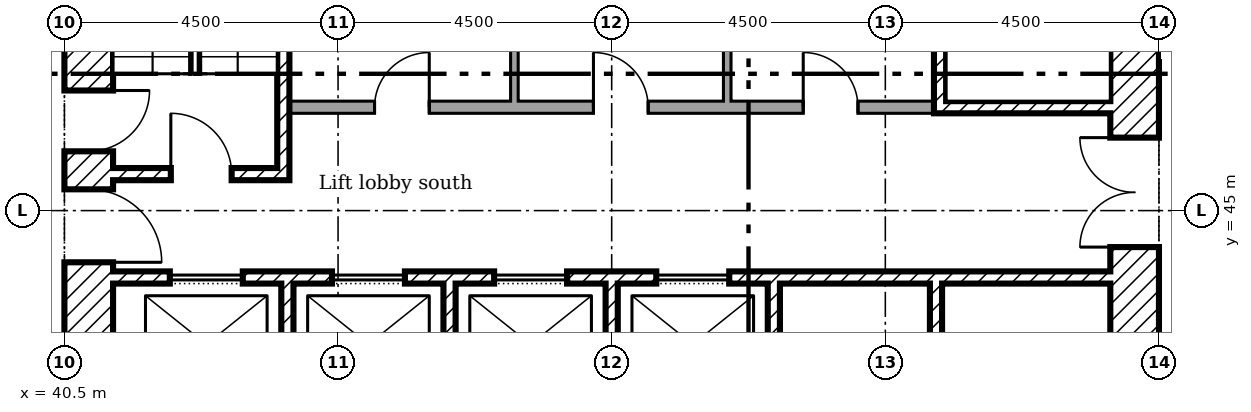
"""IFC4 building model, lengths in metres.
Left out: names, types, materials, properties, quantities, classifications, styles, units other than length and angle.
Written with IfcOpenShell. Run it as: python <this file> out.ifc"""

import sys

from ifc_helpers import new_model, si_unit, direction, frame, frame_2d, origin, place, context, subcontext, project, spatial, rectangle, extrude, element, fill, save


model = new_model("IFC4")
c1 = context("Model", 3, precision=1e-05, world=origin(), true_north=direction((0.0, 1.0)))
c2 = subcontext(c1, "Body", "Model", "MODEL_VIEW")
j1 = project(units=[si_unit("LENGTHUNIT", "METRE"), si_unit("PLANEANGLEUNIT", "RADIAN")], contexts=[c1])
p1 = place(None, origin())
s1 = spatial("IfcSite", under=j1, at=p1, CompositionType="ELEMENT")
p2 = place(p1, origin())
s2 = spatial("IfcBuilding", under=s1, at=p2, CompositionType="ELEMENT")
p3 = place(p2, frame((0.0, 0.0, 76.2)))
s3 = spatial("IfcBuildingStorey", under=s2, at=p3, CompositionType="ELEMENT", Elevation=76.2)
p4 = place(p3, frame((58.1, 40.5, 0.0), z_axis=(0.0, 0.0, 1.0), x_axis=(0.0, 1.0, 0.0)))
e1 = element("IfcWall", 1, at=p4, inside=s3, PredefinedType="SHEAR", context=c2, shape_type="SweptSolid", body=[
    extrude(rectangle(XDim=18.0, YDim=0.8, at=frame_2d((9.0, 0.0))), origin(), (0.0, 0.0, 1.0), 3.35),
])
p5 = place(p4, frame((13.15, 0.0, 0.0)))
e2 = element("IfcOpeningElement", 2, at=p5, cuts=e1, PredefinedType="OPENING", context=c2, shape_type="SweptSolid", body=[
    extrude(rectangle(XDim=1.2, YDim=2.1, at=frame_2d((0.6, 1.05))), frame((0.0, 0.41, 0.0), z_axis=(0.0, -1.0, 0.0), x_axis=(1.0, 0.0, 0.0)), (0.0, 0.0, 1.0), 0.82),
])
p6 = place(p4, frame((3.9, 0.0, 0.0)))
e3 = element("IfcOpeningElement", 3, at=p6, cuts=e1, PredefinedType="OPENING", context=c2, shape_type="SweptSolid", body=[
    extrude(rectangle(XDim=1.8, YDim=2.1, at=frame_2d((0.9, 1.05))), frame((0.0, 0.41, 0.0), z_axis=(0.0, -1.0, 0.0), x_axis=(1.0, 0.0, 0.0)), (0.0, 0.0, 1.0), 0.82),
])
p7 = place(p4, frame((11.525, 0.0, 0.0)))
e4 = element("IfcOpeningElement", 4, at=p7, cuts=e1, PredefinedType="OPENING", context=c2, shape_type="SweptSolid", body=[
    extrude(rectangle(XDim=1.0, YDim=2.1, at=frame_2d((0.5, 1.05))), frame((0.0, 0.41, 0.0), z_axis=(0.0, -1.0, 0.0), x_axis=(1.0, 0.0, 0.0)), (0.0, 0.0, 1.0), 0.82),
])
p8 = place(p3, frame((40.9, 40.5, 0.0), z_axis=(0.0, 0.0, 1.0), x_axis=(0.0, 1.0, 0.0)))
e5 = element("IfcWall", 5, at=p8, inside=s3, PredefinedType="SHEAR", context=c2, shape_type="SweptSolid", body=[
    extrude(rectangle(XDim=18.0, YDim=0.8, at=frame_2d((9.0, 0.0))), origin(), (0.0, 0.0, 1.0), 3.35),
])
p9 = place(p8, frame((3.65, 0.0, 0.0)))
e6 = element("IfcOpeningElement", 6, at=p9, cuts=e5, PredefinedType="OPENING", context=c2, shape_type="SweptSolid", body=[
    extrude(rectangle(XDim=1.2, YDim=2.1, at=frame_2d((0.6, 1.05))), frame((0.0, 0.41, 0.0), z_axis=(0.0, -1.0, 0.0), x_axis=(1.0, 0.0, 0.0)), (0.0, 0.0, 1.0), 0.82),
])
p10 = place(p8, frame((5.475, 0.0, 0.0)))
e7 = element("IfcOpeningElement", 7, at=p10, cuts=e5, PredefinedType="OPENING", context=c2, shape_type="SweptSolid", body=[
    extrude(rectangle(XDim=1.0, YDim=2.1, at=frame_2d((0.5, 1.05))), frame((0.0, 0.41, 0.0), z_axis=(0.0, -1.0, 0.0), x_axis=(1.0, 0.0, 0.0)), (0.0, 0.0, 1.0), 0.82),
])
p11 = place(p8, frame((12.3, 0.0, 0.0)))
e8 = element("IfcOpeningElement", 8, at=p11, cuts=e5, PredefinedType="OPENING", context=c2, shape_type="SweptSolid", body=[
    extrude(rectangle(XDim=1.0, YDim=2.1, at=frame_2d((0.5, 1.05))), frame((0.0, 0.41, 0.0), z_axis=(0.0, -1.0, 0.0), x_axis=(1.0, 0.0, 0.0)), (0.0, 0.0, 1.0), 0.82),
])
for number, where, z_axis, x_axis in (
    (9, (44.167, 41.3, 0.0), (0.0, 0.0, 1.0), (0.0, 1.0, 0.0)),
    (10, (46.833, 41.3, 0.0), (0.0, 0.0, 1.0), (0.0, 1.0, 0.0)),
    (11, (49.5, 41.3, 0.0), (0.0, 0.0, 1.0), (0.0, 1.0, 0.0)),
    (12, (52.167, 41.3, 0.0), (0.0, 0.0, 1.0), (0.0, 1.0, 0.0)),
    (13, (54.833, 41.3, 0.0), (0.0, 0.0, 1.0), (0.0, 1.0, 0.0)),
):
    element("IfcWall", number, at=place(p3, frame(where, z_axis=z_axis, x_axis=x_axis)), inside=s3, PredefinedType="SHEAR", context=c2, shape_type="SweptSolid", body=[
        extrude(rectangle(XDim=2.5, YDim=0.2, at=frame_2d((1.25, 0.0))), origin(), (0.0, 0.0, 1.0), 3.35),
    ])
p12 = place(p3, frame((41.3, 43.9, 0.0)))
e14 = element("IfcWall", 14, at=p12, inside=s3, PredefinedType="SHEAR", context=c2, shape_type="SweptSolid", body=[
    extrude(rectangle(XDim=16.4, YDim=0.2, at=frame_2d((8.2, 0.0))), origin(), (0.0, 0.0, 1.0), 3.35),
])
p13 = place(p12, frame((0.933, 0.0, 0.0)))
e15 = element("IfcOpeningElement", 15, at=p13, cuts=e14, PredefinedType="OPENING", context=c2, shape_type="SweptSolid", body=[
    extrude(rectangle(XDim=1.2, YDim=2.1, at=frame_2d((0.6, 1.05))), frame((0.0, 0.11, 0.0), z_axis=(0.0, -1.0, 0.0), x_axis=(1.0, 0.0, 0.0)), (0.0, 0.0, 1.0), 0.22),
])
p14 = place(p12, frame((3.6, 0.0, 0.0)))
e16 = element("IfcOpeningElement", 16, at=p14, cuts=e14, PredefinedType="OPENING", context=c2, shape_type="SweptSolid", body=[
    extrude(rectangle(XDim=1.2, YDim=2.1, at=frame_2d((0.6, 1.05))), frame((0.0, 0.11, 0.0), z_axis=(0.0, -1.0, 0.0), x_axis=(1.0, 0.0, 0.0)), (0.0, 0.0, 1.0), 0.22),
])
p15 = place(p12, frame((6.267, 0.0, 0.0)))
e17 = element("IfcOpeningElement", 17, at=p15, cuts=e14, PredefinedType="OPENING", context=c2, shape_type="SweptSolid", body=[
    extrude(rectangle(XDim=1.2, YDim=2.1, at=frame_2d((0.6, 1.05))), frame((0.0, 0.11, 0.0), z_axis=(0.0, -1.0, 0.0), x_axis=(1.0, 0.0, 0.0)), (0.0, 0.0, 1.0), 0.22),
])
p16 = place(p12, frame((8.933, 0.0, 0.0)))
e18 = element("IfcOpeningElement", 18, at=p16, cuts=e14, PredefinedType="OPENING", context=c2, shape_type="SweptSolid", body=[
    extrude(rectangle(XDim=1.2, YDim=2.1, at=frame_2d((0.6, 1.05))), frame((0.0, 0.11, 0.0), z_axis=(0.0, -1.0, 0.0), x_axis=(1.0, 0.0, 0.0)), (0.0, 0.0, 1.0), 0.22),
])
p17 = place(p3, frame((44.1, 45.5, 0.0), z_axis=(0.0, 0.0, 1.0), x_axis=(0.0, 1.0, 0.0)))
e19 = element("IfcWall", 19, at=p17, inside=s3, PredefinedType="SHEAR", context=c2, shape_type="SweptSolid", body=[
    extrude(rectangle(XDim=6.9, YDim=0.2, at=frame_2d((3.45, 0.0))), origin(), (0.0, 0.0, 1.0), 3.35),
])
p18 = place(p3, frame((41.3, 45.6, 0.0)))
e20 = element("IfcWall", 20, at=p18, inside=s3, PredefinedType="SHEAR", context=c2, shape_type="SweptSolid", body=[
    extrude(rectangle(XDim=2.7, YDim=0.2, at=frame_2d((1.35, 0.0))), origin(), (0.0, 0.0, 1.0), 3.35),
])
p19 = place(p18, frame((0.95, 0.0, 0.0)))
e21 = element("IfcOpeningElement", 21, at=p19, cuts=e20, PredefinedType="OPENING", context=c2, shape_type="SweptSolid", body=[
    extrude(rectangle(XDim=1.0, YDim=2.1, at=frame_2d((0.5, 1.05))), frame((0.0, 0.11, 0.0), z_axis=(0.0, -1.0, 0.0), x_axis=(1.0, 0.0, 0.0)), (0.0, 0.0, 1.0), 0.22),
])
p20 = place(p3, frame((54.8, 46.7, 0.0)))
e22 = element("IfcWall", 22, at=p20, inside=s3, PredefinedType="SHEAR", context=c2, shape_type="SweptSolid", body=[
    extrude(rectangle(XDim=2.9, YDim=0.2, at=frame_2d((1.45, 0.0))), origin(), (0.0, 0.0, 1.0), 3.35),
])
p21 = place(p3, frame((54.9, 46.8, 0.0), z_axis=(0.0, 0.0, 1.0), x_axis=(0.0, 1.0, 0.0)))
e23 = element("IfcWall", 23, at=p21, inside=s3, PredefinedType="SHEAR", context=c2, shape_type="SweptSolid", body=[
    extrude(rectangle(XDim=6.5, YDim=0.2, at=frame_2d((3.25, 0.0))), origin(), (0.0, 0.0, 1.0), 3.35),
])
p22 = place(p3, frame((44.2, 46.7, 0.0)))
e24 = element("IfcWall", 24, at=p22, inside=s3, PredefinedType="PARTITIONING", context=c2, shape_type="SweptSolid", body=[
    extrude(rectangle(XDim=10.6, YDim=0.2, at=frame_2d((5.3, 0.0))), origin(), (0.0, 0.0, 1.0), 3.35),
])
p23 = place(p22, frame((1.4, 0.0, 0.0)))
e25 = element("IfcOpeningElement", 25, at=p23, cuts=e24, PredefinedType="OPENING", context=c2, shape_type="SweptSolid", body=[
    extrude(rectangle(XDim=0.9, YDim=2.1, at=frame_2d((0.45, 1.05))), frame((0.0, 0.11, 0.0), z_axis=(0.0, -1.0, 0.0), x_axis=(1.0, 0.0, 0.0)), (0.0, 0.0, 1.0), 0.22),
])
p24 = place(p22, frame((5.0, 0.0, 0.0)))
e26 = element("IfcOpeningElement", 26, at=p24, cuts=e24, PredefinedType="OPENING", context=c2, shape_type="SweptSolid", body=[
    extrude(rectangle(XDim=0.9, YDim=2.1, at=frame_2d((0.45, 1.05))), frame((0.0, 0.11, 0.0), z_axis=(0.0, -1.0, 0.0), x_axis=(1.0, 0.0, 0.0)), (0.0, 0.0, 1.0), 0.22),
])
p25 = place(p22, frame((8.45, 0.0, 0.0)))
e27 = element("IfcOpeningElement", 27, at=p25, cuts=e24, PredefinedType="OPENING", context=c2, shape_type="SweptSolid", body=[
    extrude(rectangle(XDim=0.9, YDim=2.1, at=frame_2d((0.45, 1.05))), frame((0.0, 0.11, 0.0), z_axis=(0.0, -1.0, 0.0), x_axis=(1.0, 0.0, 0.0)), (0.0, 0.0, 1.0), 0.22),
])
p26 = place(p3, frame((47.9, 46.8, 0.0), z_axis=(0.0, 0.0, 1.0), x_axis=(0.0, 1.0, 0.0)))
e28 = element("IfcWall", 28, at=p26, inside=s3, PredefinedType="PARTITIONING", context=c2, shape_type="SweptSolid", body=[
    extrude(rectangle(XDim=5.0, YDim=0.125, at=frame_2d((2.5, 0.0))), origin(), (0.0, 0.0, 1.0), 3.35),
])
p27 = place(p3, frame((51.4, 46.8, 0.0), z_axis=(0.0, 0.0, 1.0), x_axis=(0.0, 1.0, 0.0)))
e29 = element("IfcWall", 29, at=p27, inside=s3, PredefinedType="PARTITIONING", context=c2, shape_type="SweptSolid", body=[
    extrude(rectangle(XDim=2.762, YDim=0.125, at=frame_2d((1.381, 0.0))), origin(), (0.0, 0.0, 1.0), 3.35),
])
p28 = place(p6, origin())
e30 = element("IfcDoor", 30, at=p28, inside=s3, OperationType="DOUBLE_DOOR_SINGLE_SWING", PredefinedType="DOOR", context=c2, shape_type="SweptSolid", body=[
    extrude(rectangle(XDim=1.8, YDim=2.1, at=frame_2d((0.9, 1.05))), frame((0.0, 0.025, 0.0), z_axis=(0.0, -1.0, 0.0), x_axis=(1.0, 0.0, 0.0)), (0.0, 0.0, 1.0), 0.05),
])
fill(e3, e30)
p29 = place(p9, frame((1.2, 0.0, 0.0), x_axis=(-1.0, 0.0, 0.0)))
e31 = element("IfcDoor", 31, at=p29, inside=s3, OperationType="SINGLE_SWING_LEFT", PredefinedType="DOOR", context=c2, shape_type="SweptSolid", body=[
    extrude(rectangle(XDim=1.2, YDim=2.1, at=frame_2d((0.6, 1.05))), frame((0.0, 0.025, 0.0), z_axis=(0.0, -1.0, 0.0), x_axis=(1.0, 0.0, 0.0)), (0.0, 0.0, 1.0), 0.05),
])
fill(e6, e31)
p30 = place(p19, origin())
e32 = element("IfcDoor", 32, at=p30, inside=s3, OperationType="SINGLE_SWING_RIGHT", PredefinedType="DOOR", context=c2, shape_type="SweptSolid", body=[
    extrude(rectangle(XDim=1.0, YDim=2.1, at=frame_2d((0.5, 1.05))), frame((0.0, 0.025, 0.0), z_axis=(0.0, -1.0, 0.0), x_axis=(1.0, 0.0, 0.0)), (0.0, 0.0, 1.0), 0.05),
])
fill(e21, e32)
p31 = place(p10, frame((1.0, 0.0, 0.0), x_axis=(-1.0, 0.0, 0.0)))
e33 = element("IfcDoor", 33, at=p31, inside=s3, OperationType="SINGLE_SWING_RIGHT", PredefinedType="DOOR", context=c2, shape_type="SweptSolid", body=[
    extrude(rectangle(XDim=1.0, YDim=2.1, at=frame_2d((0.5, 1.05))), frame((0.0, 0.025, 0.0), z_axis=(0.0, -1.0, 0.0), x_axis=(1.0, 0.0, 0.0)), (0.0, 0.0, 1.0), 0.05),
])
fill(e7, e33)
p32 = place(p23, origin())
e34 = element("IfcDoor", 34, at=p32, inside=s3, OperationType="SINGLE_SWING_LEFT", PredefinedType="DOOR", context=c2, shape_type="SweptSolid", body=[
    extrude(rectangle(XDim=0.9, YDim=2.1, at=frame_2d((0.45, 1.05))), frame((0.0, 0.025, 0.0), z_axis=(0.0, -1.0, 0.0), x_axis=(1.0, 0.0, 0.0)), (0.0, 0.0, 1.0), 0.05),
])
fill(e25, e34)
p33 = place(p24, origin())
e35 = element("IfcDoor", 35, at=p33, inside=s3, OperationType="SINGLE_SWING_RIGHT", PredefinedType="DOOR", context=c2, shape_type="SweptSolid", body=[
    extrude(rectangle(XDim=0.9, YDim=2.1, at=frame_2d((0.45, 1.05))), frame((0.0, 0.025, 0.0), z_axis=(0.0, -1.0, 0.0), x_axis=(1.0, 0.0, 0.0)), (0.0, 0.0, 1.0), 0.05),
])
fill(e26, e35)
p34 = place(p25, origin())
e36 = element("IfcDoor", 36, at=p34, inside=s3, OperationType="SINGLE_SWING_RIGHT", PredefinedType="DOOR", context=c2, shape_type="SweptSolid", body=[
    extrude(rectangle(XDim=0.9, YDim=2.1, at=frame_2d((0.45, 1.05))), frame((0.0, 0.025, 0.0), z_axis=(0.0, -1.0, 0.0), x_axis=(1.0, 0.0, 0.0)), (0.0, 0.0, 1.0), 0.05),
])
fill(e27, e36)
p35 = place(p13, origin())
e37 = element("IfcDoor", 37, at=p35, inside=s3, OperationType="SLIDING_TO_LEFT", PredefinedType="DOOR", context=c2, shape_type="SweptSolid", body=[
    extrude(rectangle(XDim=1.2, YDim=2.1, at=frame_2d((0.6, 1.05))), frame((0.0, 0.025, 0.0), z_axis=(0.0, -1.0, 0.0), x_axis=(1.0, 0.0, 0.0)), (0.0, 0.0, 1.0), 0.05),
])
fill(e15, e37)
p36 = place(p14, origin())
e38 = element("IfcDoor", 38, at=p36, inside=s3, OperationType="SLIDING_TO_LEFT", PredefinedType="DOOR", context=c2, shape_type="SweptSolid", body=[
    extrude(rectangle(XDim=1.2, YDim=2.1, at=frame_2d((0.6, 1.05))), frame((0.0, 0.025, 0.0), z_axis=(0.0, -1.0, 0.0), x_axis=(1.0, 0.0, 0.0)), (0.0, 0.0, 1.0), 0.05),
])
fill(e16, e38)
p37 = place(p15, origin())
e39 = element("IfcDoor", 39, at=p37, inside=s3, OperationType="SLIDING_TO_LEFT", PredefinedType="DOOR", context=c2, shape_type="SweptSolid", body=[
    extrude(rectangle(XDim=1.2, YDim=2.1, at=frame_2d((0.6, 1.05))), frame((0.0, 0.025, 0.0), z_axis=(0.0, -1.0, 0.0), x_axis=(1.0, 0.0, 0.0)), (0.0, 0.0, 1.0), 0.05),
])
fill(e17, e39)
p38 = place(p16, origin())
e40 = element("IfcDoor", 40, at=p38, inside=s3, OperationType="SLIDING_TO_LEFT", PredefinedType="DOOR", context=c2, shape_type="SweptSolid", body=[
    extrude(rectangle(XDim=1.2, YDim=2.1, at=frame_2d((0.6, 1.05))), frame((0.0, 0.025, 0.0), z_axis=(0.0, -1.0, 0.0), x_axis=(1.0, 0.0, 0.0)), (0.0, 0.0, 1.0), 0.05),
])
fill(e18, e40)
save(model, sys.argv[1])
